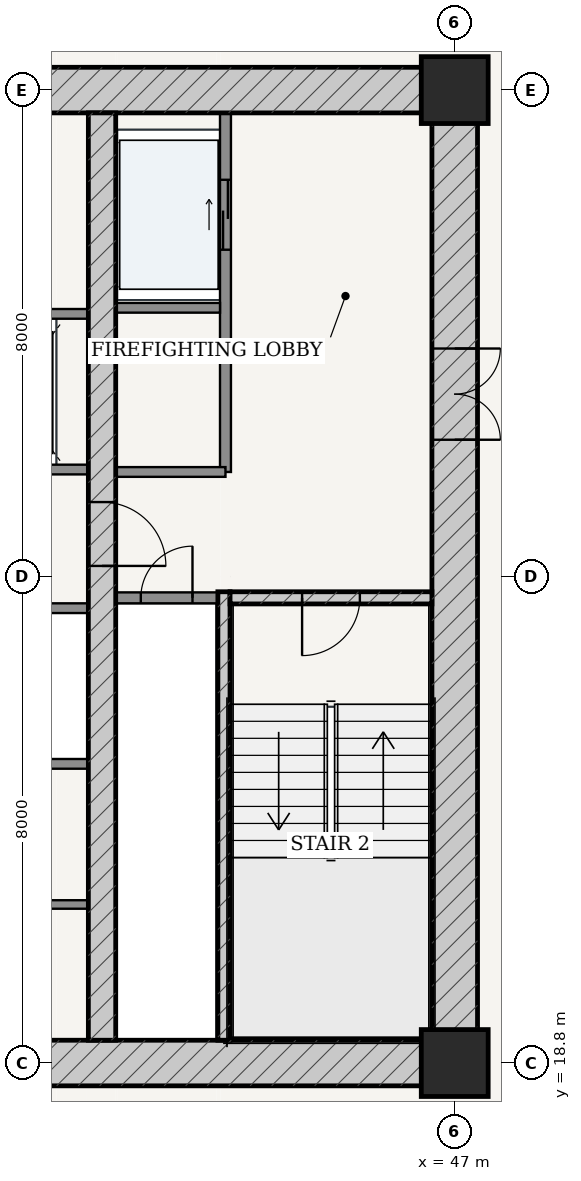
"""IFC4 building model, lengths in metres.
Left out: names, types, materials, properties, quantities, classifications, styles, units other than length and angle.
Written with IfcOpenShell. Run it as: python <this file> out.ifc"""

import sys

from ifc_helpers import new_model, si_unit, direction, frame, frame_2d, origin, origin_2d, place, context, subcontext, project, spatial, rectangle, extrude, source, transform, mapped, element, fill, save


model = new_model("IFC4")
c1 = context("Model", 3, precision=1e-05, world=origin(), true_north=direction((-0.2419218956, 0.970295726276)))
c2 = subcontext(c1, "Body", "Model", "MODEL_VIEW")
j1 = project(units=[si_unit("LENGTHUNIT", "METRE"), si_unit("PLANEANGLEUNIT", "RADIAN")], contexts=[c1])
p1 = place(None, origin())
s1 = spatial("IfcSite", under=j1, at=p1, CompositionType="ELEMENT")
p2 = place(p1, origin())
s2 = spatial("IfcBuilding", under=s1, at=p2, CompositionType="ELEMENT")
p3 = place(p2, frame((0.0, 0.0, 24.0)))
s3 = spatial("IfcBuildingStorey", under=s2, at=p3, CompositionType="ELEMENT", Elevation=24.0)
for number, where, z_axis, x_axis in (
    (1, (47.0, 18.8, 0.0), (0.0, 0.0, 1.0), (1.0, 0.0, 0.0)),
    (2, (47.0, 34.8, 0.0), (0.0, 0.0, 1.0), (1.0, 0.0, 0.0)),
):
    element("IfcColumn", number, at=place(p3, frame(where, z_axis=z_axis, x_axis=x_axis)), inside=s3, PredefinedType="COLUMN", context=c2, shape_type="SweptSolid", body=[
        extrude(rectangle(XDim=1.1, YDim=1.1, at=origin_2d()), origin(), (0.0, 0.0, 1.0), 3.6),
    ])
p4 = place(p3, frame((28.625, 18.8, 0.0), z_axis=(0.0, 0.0, 1.0), x_axis=(1.0, 0.0, 0.0)))
e3 = element("IfcWall", 3, at=p4, inside=s3, PredefinedType="SHEAR", context=c2, shape_type="SweptSolid", body=[
    extrude(rectangle(XDim=18.75, YDim=0.75, at=frame_2d((9.375, 0.0))), origin(), (0.0, 0.0, 1.0), 3.32),
])
p5 = place(p4, frame((8.95, 0.0, 0.0)))
e4 = element("IfcOpeningElement", 4, at=p5, cuts=e3, PredefinedType="OPENING", context=c2, shape_type="SweptSolid", body=[
    extrude(rectangle(XDim=0.85, YDim=2.1, at=frame_2d((0.425, 1.05))), frame((0.0, 0.385, 0.0), z_axis=(0.0, -1.0, 0.0), x_axis=(1.0, 0.0, 0.0)), (0.0, 0.0, 1.0), 0.77),
])
p6 = place(p3, frame((28.625, 34.8, 0.0), z_axis=(0.0, 0.0, 1.0), x_axis=(1.0, 0.0, 0.0)))
e5 = element("IfcWall", 5, at=p6, inside=s3, PredefinedType="SHEAR", context=c2, shape_type="SweptSolid", body=[
    extrude(rectangle(XDim=18.75, YDim=0.75, at=frame_2d((9.375, 0.0))), origin(), (0.0, 0.0, 1.0), 3.32),
])
p7 = place(p6, frame((8.95, 0.0, 0.0)))
e6 = element("IfcOpeningElement", 6, at=p7, cuts=e5, PredefinedType="OPENING", context=c2, shape_type="SweptSolid", body=[
    extrude(rectangle(XDim=0.85, YDim=2.1, at=frame_2d((0.425, 1.05))), frame((0.0, 0.385, 0.0), z_axis=(0.0, -1.0, 0.0), x_axis=(1.0, 0.0, 0.0)), (0.0, 0.0, 1.0), 0.77),
])
p8 = place(p3, frame((47.0, 19.175, 0.0), z_axis=(0.0, 0.0, 1.0), x_axis=(0.0, 1.0, 0.0)))
e7 = element("IfcWall", 7, at=p8, inside=s3, PredefinedType="SHEAR", context=c2, shape_type="SweptSolid", body=[
    extrude(rectangle(XDim=15.25, YDim=0.75, at=frame_2d((7.625, 0.0))), origin(), (0.0, 0.0, 1.0), 3.32),
])
p9 = place(p8, frame((9.875, 0.0, 0.0)))
e8 = element("IfcOpeningElement", 8, at=p9, cuts=e7, PredefinedType="OPENING", context=c2, shape_type="SweptSolid", body=[
    extrude(rectangle(XDim=1.5, YDim=2.2, at=frame_2d((0.75, 1.1))), frame((0.0, 0.385, 0.0), z_axis=(0.0, -1.0, 0.0), x_axis=(1.0, 0.0, 0.0)), (0.0, 0.0, 1.0), 0.77),
])
p10 = place(p3, frame((43.205, 19.175, 0.0), z_axis=(0.0, 0.0, 1.0), x_axis=(0.0, 1.0, 0.0)))
e9 = element("IfcWall", 9, at=p10, inside=s3, PredefinedType="SOLIDWALL", context=c2, shape_type="SweptSolid", body=[
    extrude(rectangle(XDim=7.375, YDim=0.2, at=frame_2d((3.688, 0.0))), origin(), (0.0, 0.0, 1.0), 3.32),
])
p11 = place(p3, frame((43.305, 26.45, 0.0), z_axis=(0.0, 0.0, 1.0), x_axis=(1.0, 0.0, 0.0)))
e10 = element("IfcWall", 10, at=p11, inside=s3, PredefinedType="SOLIDWALL", context=c2, shape_type="SweptSolid", body=[
    extrude(rectangle(XDim=3.32, YDim=0.2, at=frame_2d((1.66, 0.0))), origin(), (0.0, 0.0, 1.0), 3.32),
])
p12 = place(p11, frame((1.185, 0.0, 0.0)))
e11 = element("IfcOpeningElement", 11, at=p12, cuts=e10, PredefinedType="OPENING", context=c2, shape_type="SweptSolid", body=[
    extrude(rectangle(XDim=0.95, YDim=2.15, at=frame_2d((0.475, 1.075))), frame((0.0, 0.11, 0.0), z_axis=(0.0, -1.0, 0.0), x_axis=(1.0, 0.0, 0.0)), (0.0, 0.0, 1.0), 0.22),
])
p13 = place(p3, frame((41.2, 19.175, 0.0), z_axis=(0.0, 0.0, 1.0), x_axis=(0.0, 1.0, 0.0)))
e12 = element("IfcWall", 12, at=p13, inside=s3, PredefinedType="SHEAR", context=c2, shape_type="SweptSolid", body=[
    extrude(rectangle(XDim=15.25, YDim=0.45, at=frame_2d((7.625, 0.0))), origin(), (0.0, 0.0, 1.0), 3.32),
])
p14 = place(p13, frame((7.8, 0.0, 0.0)))
e13 = element("IfcOpeningElement", 13, at=p14, cuts=e12, PredefinedType="OPENING", context=c2, shape_type="SweptSolid", body=[
    extrude(rectangle(XDim=1.05, YDim=2.15, at=frame_2d((0.525, 1.075))), frame((0.0, 0.235, 0.0), z_axis=(0.0, -1.0, 0.0), x_axis=(1.0, 0.0, 0.0)), (0.0, 0.0, 1.0), 0.47),
])
p15 = place(p3, frame((41.425, 26.45, 0.0), z_axis=(0.0, 0.0, 1.0), x_axis=(1.0, 0.0, 0.0)))
e14 = element("IfcWall", 14, at=p15, inside=s3, PredefinedType="PARTITIONING", context=c2, shape_type="SweptSolid", body=[
    extrude(rectangle(XDim=1.675, YDim=0.18, at=frame_2d((0.837, 0.0))), origin(), (0.0, 0.0, 1.0), 3.32),
])
p16 = place(p15, frame((0.413, 0.0, 0.0)))
e15 = element("IfcOpeningElement", 15, at=p16, cuts=e14, PredefinedType="OPENING", context=c2, shape_type="SweptSolid", body=[
    extrude(rectangle(XDim=0.85, YDim=2.1, at=frame_2d((0.425, 1.05))), frame((0.0, 0.1, 0.0), z_axis=(0.0, -1.0, 0.0), x_axis=(1.0, 0.0, 0.0)), (0.0, 0.0, 1.0), 0.2),
])
p17 = place(p3, frame((43.23, 28.52, 0.0), z_axis=(0.0, 0.0, 1.0), x_axis=(0.0, 1.0, 0.0)))
e16 = element("IfcWall", 16, at=p17, inside=s3, PredefinedType="PARTITIONING", context=c2, shape_type="SweptSolid", body=[
    extrude(rectangle(XDim=5.905, YDim=0.18, at=frame_2d((2.953, 0.0))), origin(), (0.0, 0.0, 1.0), 3.32),
])
p18 = place(p17, frame((3.655, 0.0, 0.0)))
e17 = element("IfcOpeningElement", 17, at=p18, cuts=e16, PredefinedType="OPENING", context=c2, shape_type="SweptSolid", body=[
    extrude(rectangle(XDim=1.15, YDim=2.2, at=frame_2d((0.575, 1.1))), frame((0.0, 0.1, 0.0), z_axis=(0.0, -1.0, 0.0), x_axis=(1.0, 0.0, 0.0)), (0.0, 0.0, 1.0), 0.2),
])
p19 = place(p3, frame((41.425, 31.22, 0.0), z_axis=(0.0, 0.0, 1.0), x_axis=(1.0, 0.0, 0.0)))
e18 = element("IfcWall", 18, at=p19, inside=s3, PredefinedType="PARTITIONING", context=c2, shape_type="SweptSolid", body=[
    extrude(rectangle(XDim=1.715, YDim=0.16, at=frame_2d((0.857, 0.0))), origin(), (0.0, 0.0, 1.0), 3.32),
])
p20 = place(p3, frame((41.425, 28.52, 0.0), z_axis=(0.0, 0.0, 1.0), x_axis=(1.0, 0.0, 0.0)))
e19 = element("IfcWall", 19, at=p20, inside=s3, PredefinedType="PARTITIONING", context=c2, shape_type="SweptSolid", body=[
    extrude(rectangle(XDim=1.805, YDim=0.16, at=frame_2d((0.902, 0.0))), origin(), (0.0, 0.0, 1.0), 3.32),
])
p21 = place(p3, frame((35.025, 28.56, 0.0), z_axis=(0.0, 0.0, 1.0), x_axis=(1.0, 0.0, 0.0)))
e20 = element("IfcWall", 20, at=p21, inside=s3, PredefinedType="PARTITIONING", context=c2, shape_type="SweptSolid", body=[
    extrude(rectangle(XDim=5.95, YDim=0.16, at=frame_2d((2.975, 0.0))), origin(), (0.0, 0.0, 1.0), 3.32),
])
p22 = place(p21, frame((0.76, 0.0, 0.0)))
e21 = element("IfcOpeningElement", 21, at=p22, cuts=e20, PredefinedType="OPENING", context=c2, shape_type="SweptSolid", body=[
    extrude(rectangle(XDim=1.1, YDim=2.2, at=frame_2d((0.55, 1.1))), frame((0.0, 0.09, 0.0), z_axis=(0.0, -1.0, 0.0), x_axis=(1.0, 0.0, 0.0)), (0.0, 0.0, 1.0), 0.18),
])
p23 = place(p21, frame((2.425, 0.0, 0.0)))
e22 = element("IfcOpeningElement", 22, at=p23, cuts=e20, PredefinedType="OPENING", context=c2, shape_type="SweptSolid", body=[
    extrude(rectangle(XDim=1.1, YDim=2.2, at=frame_2d((0.55, 1.1))), frame((0.0, 0.09, 0.0), z_axis=(0.0, -1.0, 0.0), x_axis=(1.0, 0.0, 0.0)), (0.0, 0.0, 1.0), 0.18),
])
p24 = place(p21, frame((4.09, 0.0, 0.0)))
e23 = element("IfcOpeningElement", 23, at=p24, cuts=e20, PredefinedType="OPENING", context=c2, shape_type="SweptSolid", body=[
    extrude(rectangle(XDim=1.1, YDim=2.2, at=frame_2d((0.55, 1.1))), frame((0.0, 0.09, 0.0), z_axis=(0.0, -1.0, 0.0), x_axis=(1.0, 0.0, 0.0)), (0.0, 0.0, 1.0), 0.18),
])
for number, where, z_axis, x_axis in (
    (24, (35.025, 31.12, 0.0), (0.0, 0.0, 1.0), (1.0, 0.0, 0.0)),
    (25, (35.025, 26.28, 0.0), (0.0, 0.0, 1.0), (1.0, 0.0, 0.0)),
    (26, (35.025, 23.72, 0.0), (0.0, 0.0, 1.0), (1.0, 0.0, 0.0)),
):
    element("IfcWall", number, at=place(p3, frame(where, z_axis=z_axis, x_axis=x_axis)), inside=s3, PredefinedType="PARTITIONING", context=c2, shape_type="SweptSolid", body=[
        extrude(rectangle(XDim=5.95, YDim=0.16, at=frame_2d((2.975, 0.0))), origin(), (0.0, 0.0, 1.0), 3.32),
    ])
p25 = place(p3, frame((35.025, 21.407, 0.0), z_axis=(0.0, 0.0, 1.0), x_axis=(1.0, 0.0, 0.0)))
e27 = element("IfcWall", 27, at=p25, inside=s3, PredefinedType="PARTITIONING", context=c2, shape_type="SweptSolid", body=[
    extrude(rectangle(XDim=5.95, YDim=0.14, at=frame_2d((2.975, 0.0))), origin(), (0.0, 0.0, 1.0), 3.32),
])
p26 = place(p25, frame((2.55, 0.0, 0.0)))
e28 = element("IfcOpeningElement", 28, at=p26, cuts=e27, PredefinedType="OPENING", context=c2, shape_type="SweptSolid", body=[
    extrude(rectangle(XDim=0.85, YDim=2.1, at=frame_2d((0.425, 1.05))), frame((0.0, 0.08, 0.0), z_axis=(0.0, -1.0, 0.0), x_axis=(1.0, 0.0, 0.0)), (0.0, 0.0, 1.0), 0.16),
])
m1 = source(origin(), c2, "Body", "SweptSolid", [
    extrude(rectangle(XDim=1.5, YDim=2.2, at=frame_2d((0.75, 1.1))), frame((0.0, 0.025, 0.0), z_axis=(0.0, -1.0, 0.0), x_axis=(1.0, 0.0, 0.0)), (0.0, 0.0, 1.0), 0.05),
])
p27 = place(p9, frame((1.5, 0.0, 0.0), z_axis=(0.0, 0.0, 1.0), x_axis=(-1.0, 0.0, 0.0)))
e29 = element("IfcDoor", 29, at=p27, inside=s3, OperationType="DOUBLE_DOOR_SINGLE_SWING", PredefinedType="DOOR", context=c2, shape_type="MappedRepresentation", body=[
    mapped(m1, transform((0.0, 0.0, 0.0), scale=1.0)),
])
fill(e8, e29)
m2 = source(origin(), c2, "Body", "SweptSolid", [
    extrude(rectangle(XDim=1.05, YDim=2.15, at=frame_2d((0.525, 1.075))), frame((0.0, 0.025, 0.0), z_axis=(0.0, -1.0, 0.0), x_axis=(1.0, 0.0, 0.0)), (0.0, 0.0, 1.0), 0.05),
])
p28 = place(p14, frame((1.05, 0.0, 0.0), z_axis=(0.0, 0.0, 1.0), x_axis=(-1.0, 0.0, 0.0)))
e30 = element("IfcDoor", 30, at=p28, inside=s3, OperationType="SINGLE_SWING_RIGHT", PredefinedType="DOOR", context=c2, shape_type="MappedRepresentation", body=[
    mapped(m2, transform((0.0, 0.0, 0.0), scale=1.0)),
])
fill(e13, e30)
m3 = source(origin(), c2, "Body", "SweptSolid", [
    extrude(rectangle(XDim=0.95, YDim=2.15, at=frame_2d((0.475, 1.075))), frame((0.0, 0.025, 0.0), z_axis=(0.0, -1.0, 0.0), x_axis=(1.0, 0.0, 0.0)), (0.0, 0.0, 1.0), 0.05),
])
p29 = place(p12, frame((0.95, 0.0, 0.0), z_axis=(0.0, 0.0, 1.0), x_axis=(-1.0, 0.0, 0.0)))
e31 = element("IfcDoor", 31, at=p29, inside=s3, OperationType="SINGLE_SWING_RIGHT", PredefinedType="DOOR", context=c2, shape_type="MappedRepresentation", body=[
    mapped(m3, transform((0.0, 0.0, 0.0), scale=1.0)),
])
fill(e11, e31)
m4 = source(origin(), c2, "Body", "SweptSolid", [
    extrude(rectangle(XDim=0.85, YDim=2.1, at=frame_2d((0.425, 1.05))), frame((0.0, 0.025, 0.0), z_axis=(0.0, -1.0, 0.0), x_axis=(1.0, 0.0, 0.0)), (0.0, 0.0, 1.0), 0.05),
])
p30 = place(p16, origin())
e32 = element("IfcDoor", 32, at=p30, inside=s3, OperationType="SINGLE_SWING_RIGHT", PredefinedType="DOOR", context=c2, shape_type="MappedRepresentation", body=[
    mapped(m4, transform((0.0, 0.0, 0.0), scale=1.0)),
])
fill(e15, e32)
m5 = source(origin(), c2, "Body", "SweptSolid", [
    extrude(rectangle(XDim=1.15, YDim=2.2, at=frame_2d((0.575, 1.1))), frame((0.0, 0.025, 0.0), z_axis=(0.0, -1.0, 0.0), x_axis=(1.0, 0.0, 0.0)), (0.0, 0.0, 1.0), 0.05),
])
p31 = place(p18, origin())
e33 = element("IfcDoor", 33, at=p31, inside=s3, OperationType="DOUBLE_DOOR_SLIDING", PredefinedType="DOOR", context=c2, shape_type="MappedRepresentation", body=[
    mapped(m5, transform((0.0, 0.0, 0.0), scale=1.0)),
])
fill(e17, e33)
save(model, sys.argv[1])
